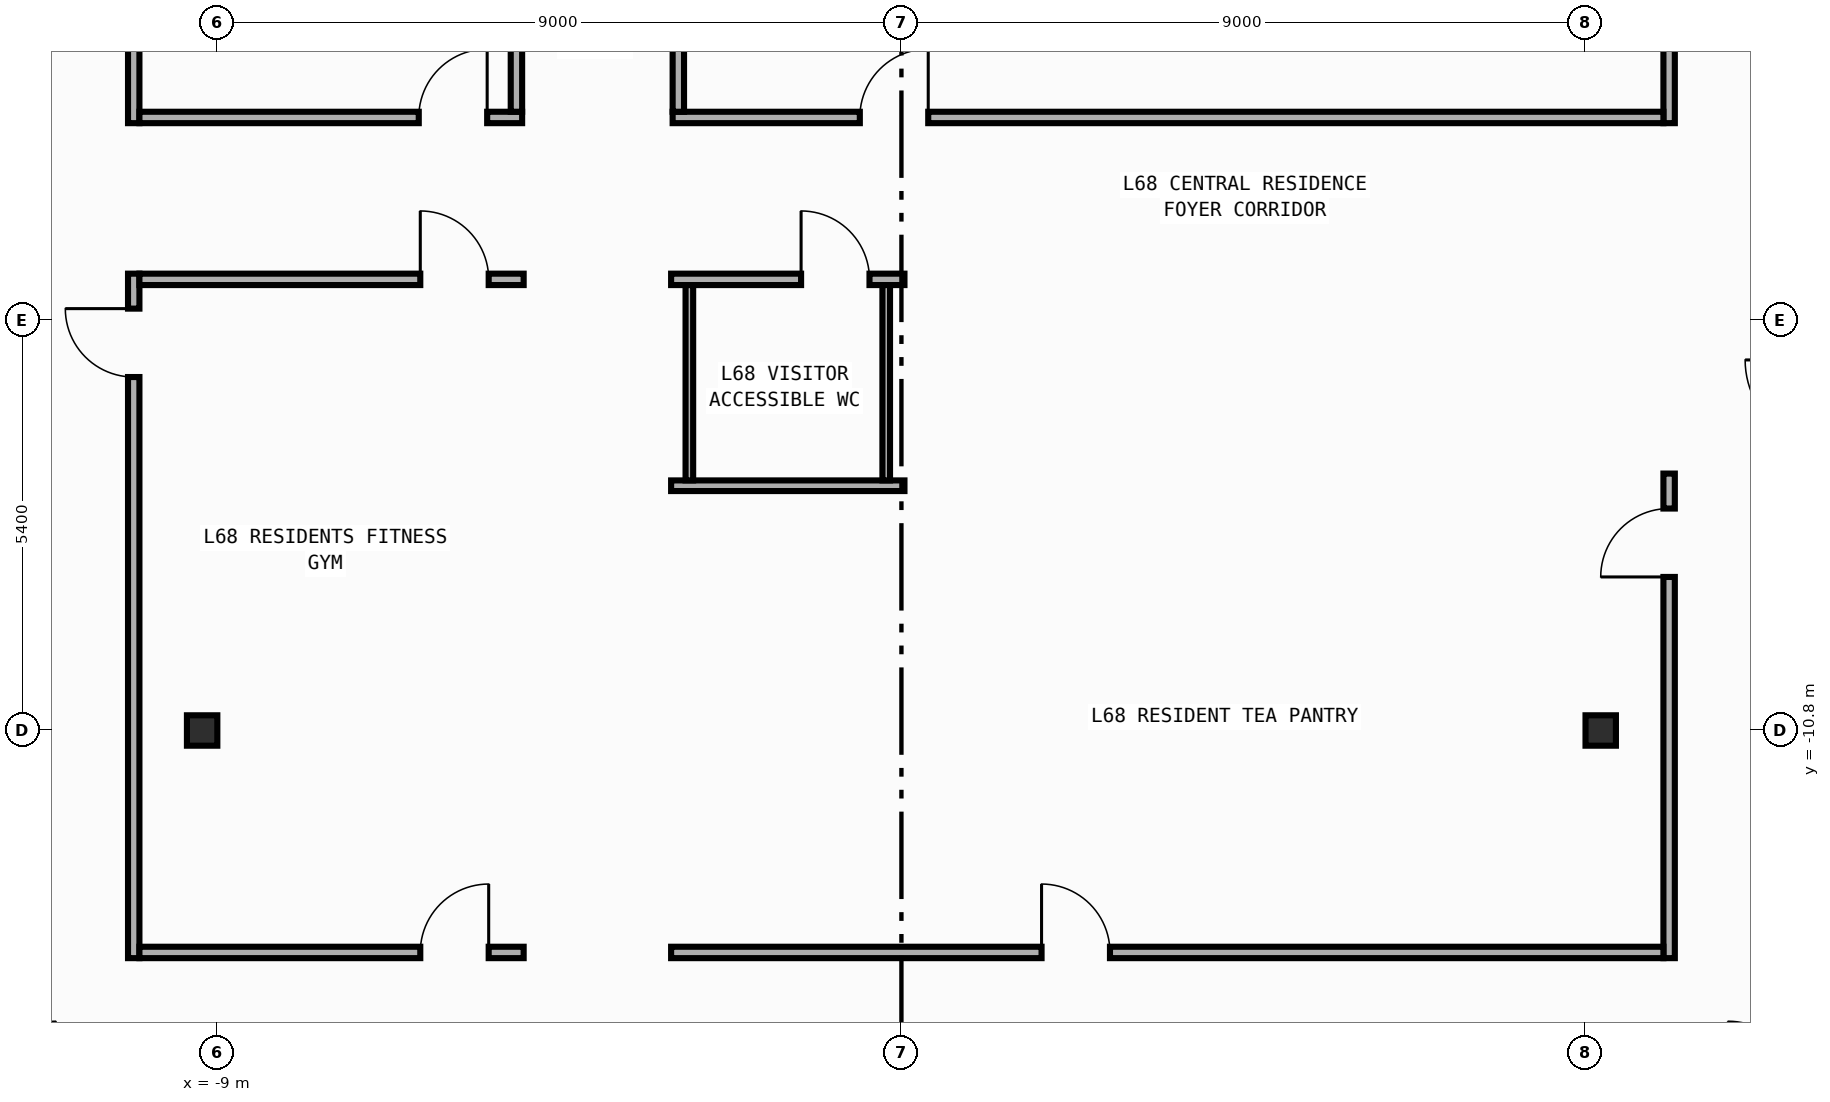
"""IFC4 building model, lengths in metres.
Left out: names, types, materials, properties, quantities, classifications, styles, units other than length and angle.
Written with IfcOpenShell. Run it as: python <this file> out.ifc"""

import sys

from ifc_helpers import new_model, si_unit, direction, frame, frame_2d, origin, origin_2d, place, context, subcontext, project, spatial, rectangle, i_section, extrude, element, fill, save


model = new_model("IFC4")
c1 = context("Model", 3, precision=1e-05, world=origin(), true_north=direction((0.0, 1.0)))
c2 = subcontext(c1, "Body", "Model", "MODEL_VIEW")
j1 = project(units=[si_unit("LENGTHUNIT", "METRE"), si_unit("PLANEANGLEUNIT", "RADIAN")], contexts=[c1])
p1 = place(None, origin())
s1 = spatial("IfcSite", under=j1, at=p1, CompositionType="ELEMENT")
p2 = place(p1, origin())
s2 = spatial("IfcBuilding", under=s1, at=p2, CompositionType="ELEMENT")
p3 = place(p2, frame((0.0, 0.0, 285.2)))
s3 = spatial("IfcBuildingStorey", under=s2, at=p3, CompositionType="ELEMENT", Elevation=285.2)
for number, where, z_axis, x_axis in (
    (1, (-9.2, -10.8, 0.0), (0.0, 0.0, 1.0), (1.0, 0.0, 0.0)),
    (2, (9.2, -10.8, 0.0), (0.0, 0.0, 1.0), (1.0, 0.0, 0.0)),
):
    element("IfcColumn", number, at=place(p3, frame(where, z_axis=z_axis, x_axis=x_axis)), inside=s3, PredefinedType="COLUMN", context=c2, shape_type="SweptSolid", body=[
        extrude(i_section(OverallWidth=0.4, OverallDepth=0.4, WebThickness=0.013, FlangeThickness=0.021, FilletRadius=0.022, at=origin_2d()), origin(), (0.0, 0.0, 1.0), 3.8),
    ])
p4 = place(p3, frame((-10.1, -2.81, 0.0), z_axis=(0.0, 0.0, 1.0), x_axis=(0.0, 1.0, 0.0)))
e3 = element("IfcWall", 3, at=p4, inside=s3, PredefinedType="PARTITIONING", context=c2, shape_type="SweptSolid", body=[
    extrude(rectangle(XDim=16.605, YDim=0.15, at=frame_2d((8.302, 0.0))), origin(), (0.0, 0.0, 1.0), 3.54),
])
p5 = place(p4, frame((7.751, 0.0, 0.0)))
e4 = element("IfcOpeningElement", 4, at=p5, cuts=e3, PredefinedType="OPENING", context=c2, shape_type="SweptSolid", body=[
    extrude(rectangle(XDim=0.9, YDim=2.15, at=frame_2d((0.45, 1.075))), frame((0.0, 0.085, 0.0), z_axis=(0.0, -1.0, 0.0), x_axis=(1.0, 0.0, 0.0)), (0.0, 0.0, 1.0), 0.17),
])
p6 = place(p3, frame((-10.1, -13.795, 0.0), z_axis=(0.0, 0.0, 1.0), x_axis=(0.0, 1.0, 0.0)))
e5 = element("IfcWall", 5, at=p6, inside=s3, PredefinedType="PARTITIONING", context=c2, shape_type="SweptSolid", body=[
    extrude(rectangle(XDim=9.005, YDim=0.15, at=frame_2d((4.502, 0.0))), origin(), (0.0, 0.0, 1.0), 3.54),
])
p7 = place(p6, frame((7.645, 0.0, 0.0)))
e6 = element("IfcOpeningElement", 6, at=p7, cuts=e5, PredefinedType="OPENING", context=c2, shape_type="SweptSolid", body=[
    extrude(rectangle(XDim=0.9, YDim=2.15, at=frame_2d((0.45, 1.075))), frame((0.0, 0.085, 0.0), z_axis=(0.0, -1.0, 0.0), x_axis=(1.0, 0.0, 0.0)), (0.0, 0.0, 1.0), 0.17),
])
p8 = place(p3, frame((10.1, -2.81, 0.0), z_axis=(0.0, 0.0, 1.0), x_axis=(0.0, 1.0, 0.0)))
e7 = element("IfcWall", 7, at=p8, inside=s3, PredefinedType="PARTITIONING", context=c2, shape_type="SweptSolid", body=[
    extrude(rectangle(XDim=16.69, YDim=0.15, at=frame_2d((8.345, 0.0))), origin(), (0.0, 0.0, 1.0), 3.54),
])
p9 = place(p8, frame((7.694, 0.0, 0.0)))
e8 = element("IfcOpeningElement", 8, at=p9, cuts=e7, PredefinedType="OPENING", context=c2, shape_type="SweptSolid", body=[
    extrude(rectangle(XDim=0.9, YDim=2.15, at=frame_2d((0.45, 1.075))), frame((0.0, 0.085, 0.0), z_axis=(0.0, -1.0, 0.0), x_axis=(1.0, 0.0, 0.0)), (0.0, 0.0, 1.0), 0.17),
])
p10 = place(p3, frame((10.1, -13.795, 0.0), z_axis=(0.0, 0.0, 1.0), x_axis=(0.0, 1.0, 0.0)))
e9 = element("IfcWall", 9, at=p10, inside=s3, PredefinedType="PARTITIONING", context=c2, shape_type="SweptSolid", body=[
    extrude(rectangle(XDim=6.375, YDim=0.15, at=frame_2d((3.188, 0.0))), origin(), (0.0, 0.0, 1.0), 3.54),
])
p11 = place(p10, frame((5.015, 0.0, 0.0)))
e10 = element("IfcOpeningElement", 10, at=p11, cuts=e9, PredefinedType="OPENING", context=c2, shape_type="SweptSolid", body=[
    extrude(rectangle(XDim=0.9, YDim=2.15, at=frame_2d((0.45, 1.075))), frame((0.0, 0.085, 0.0), z_axis=(0.0, -1.0, 0.0), x_axis=(1.0, 0.0, 0.0)), (0.0, 0.0, 1.0), 0.17),
])
p12 = place(p3, frame((-10.025, -2.735, 0.0), z_axis=(0.0, 0.0, 1.0), x_axis=(1.0, 0.0, 0.0)))
e11 = element("IfcWall", 11, at=p12, inside=s3, PredefinedType="PARTITIONING", context=c2, shape_type="SweptSolid", body=[
    extrude(rectangle(XDim=5.035, YDim=0.15, at=frame_2d((2.518, 0.0))), origin(), (0.0, 0.0, 1.0), 3.54),
])
p13 = place(p12, frame((3.675, 0.0, 0.0)))
e12 = element("IfcOpeningElement", 12, at=p13, cuts=e11, PredefinedType="OPENING", context=c2, shape_type="SweptSolid", body=[
    extrude(rectangle(XDim=0.9, YDim=2.15, at=frame_2d((0.45, 1.075))), frame((0.0, 0.085, 0.0), z_axis=(0.0, -1.0, 0.0), x_axis=(1.0, 0.0, 0.0)), (0.0, 0.0, 1.0), 0.17),
])
p14 = place(p3, frame((-10.025, -4.865, 0.0), z_axis=(0.0, 0.0, 1.0), x_axis=(1.0, 0.0, 0.0)))
e13 = element("IfcWall", 13, at=p14, inside=s3, PredefinedType="PARTITIONING", context=c2, shape_type="SweptSolid", body=[
    extrude(rectangle(XDim=5.055, YDim=0.15, at=frame_2d((2.527, 0.0))), origin(), (0.0, 0.0, 1.0), 3.54),
])
p15 = place(p14, frame((3.695, 0.0, 0.0)))
e14 = element("IfcOpeningElement", 14, at=p15, cuts=e13, PredefinedType="OPENING", context=c2, shape_type="SweptSolid", body=[
    extrude(rectangle(XDim=0.9, YDim=2.15, at=frame_2d((0.45, 1.075))), frame((0.0, 0.085, 0.0), z_axis=(0.0, -1.0, 0.0), x_axis=(1.0, 0.0, 0.0)), (0.0, 0.0, 1.0), 0.17),
])
p16 = place(p3, frame((-3.01, -2.735, 0.0), z_axis=(0.0, 0.0, 1.0), x_axis=(1.0, 0.0, 0.0)))
e15 = element("IfcWall", 15, at=p16, inside=s3, PredefinedType="PARTITIONING", context=c2, shape_type="SweptSolid", body=[
    extrude(rectangle(XDim=13.035, YDim=0.15, at=frame_2d((6.518, 0.0))), origin(), (0.0, 0.0, 1.0), 3.54),
])
p17 = place(p16, frame((2.463, 0.0, 0.0)))
e16 = element("IfcOpeningElement", 16, at=p17, cuts=e15, PredefinedType="OPENING", context=c2, shape_type="SweptSolid", body=[
    extrude(rectangle(XDim=0.9, YDim=2.15, at=frame_2d((0.45, 1.075))), frame((0.0, 0.085, 0.0), z_axis=(0.0, -1.0, 0.0), x_axis=(1.0, 0.0, 0.0)), (0.0, 0.0, 1.0), 0.17),
])
p18 = place(p3, frame((-3.03, -4.865, 0.0), z_axis=(0.0, 0.0, 1.0), x_axis=(1.0, 0.0, 0.0)))
e17 = element("IfcWall", 17, at=p18, inside=s3, PredefinedType="PARTITIONING", context=c2, shape_type="SweptSolid", body=[
    extrude(rectangle(XDim=3.07, YDim=0.15, at=frame_2d((1.535, 0.0))), origin(), (0.0, 0.0, 1.0), 3.54),
])
p19 = place(p18, frame((1.71, 0.0, 0.0)))
e18 = element("IfcOpeningElement", 18, at=p19, cuts=e17, PredefinedType="OPENING", context=c2, shape_type="SweptSolid", body=[
    extrude(rectangle(XDim=0.9, YDim=2.15, at=frame_2d((0.45, 1.075))), frame((0.0, 0.085, 0.0), z_axis=(0.0, -1.0, 0.0), x_axis=(1.0, 0.0, 0.0)), (0.0, 0.0, 1.0), 0.17),
])
p20 = place(p3, frame((-5.065, -2.66, 0.0), z_axis=(0.0, 0.0, 1.0), x_axis=(0.0, 1.0, 0.0)))
e19 = element("IfcWall", 19, at=p20, inside=s3, PredefinedType="PARTITIONING", context=c2, shape_type="SweptSolid", body=[
    extrude(rectangle(XDim=16.455, YDim=0.15, at=frame_2d((8.228, 0.0))), origin(), (0.0, 0.0, 1.0), 3.19),
])
p21 = place(p20, frame((7.677, 0.0, 0.0)))
e20 = element("IfcOpeningElement", 20, at=p21, cuts=e19, PredefinedType="OPENING", context=c2, shape_type="SweptSolid", body=[
    extrude(rectangle(XDim=0.9, YDim=2.15, at=frame_2d((0.45, 1.075))), frame((0.0, 0.085, 0.0), z_axis=(0.0, -1.0, 0.0), x_axis=(1.0, 0.0, 0.0)), (0.0, 0.0, 1.0), 0.17),
])
p22 = place(p3, frame((-2.935, -2.66, 0.0), z_axis=(0.0, 0.0, 1.0), x_axis=(0.0, 1.0, 0.0)))
e21 = element("IfcWall", 21, at=p22, inside=s3, PredefinedType="PARTITIONING", context=c2, shape_type="SweptSolid", body=[
    extrude(rectangle(XDim=16.455, YDim=0.15, at=frame_2d((8.228, 0.0))), origin(), (0.0, 0.0, 1.0), 3.54),
])
p23 = place(p22, frame((7.677, 0.0, 0.0)))
e22 = element("IfcOpeningElement", 22, at=p23, cuts=e21, PredefinedType="OPENING", context=c2, shape_type="SweptSolid", body=[
    extrude(rectangle(XDim=0.9, YDim=2.15, at=frame_2d((0.45, 1.075))), frame((0.0, 0.085, 0.0), z_axis=(0.0, -1.0, 0.0), x_axis=(1.0, 0.0, 0.0)), (0.0, 0.0, 1.0), 0.17),
])
p24 = place(p3, frame((-10.025, -13.72, 0.0), z_axis=(0.0, 0.0, 1.0), x_axis=(1.0, 0.0, 0.0)))
e23 = element("IfcWall", 23, at=p24, inside=s3, PredefinedType="PARTITIONING", context=c2, shape_type="SweptSolid", body=[
    extrude(rectangle(XDim=5.055, YDim=0.15, at=frame_2d((2.527, 0.0))), origin(), (0.0, 0.0, 1.0), 3.54),
])
p25 = place(p24, frame((3.695, 0.0, 0.0)))
e24 = element("IfcOpeningElement", 24, at=p25, cuts=e23, PredefinedType="OPENING", context=c2, shape_type="SweptSolid", body=[
    extrude(rectangle(XDim=0.9, YDim=2.15, at=frame_2d((0.45, 1.075))), frame((0.0, 0.085, 0.0), z_axis=(0.0, -1.0, 0.0), x_axis=(1.0, 0.0, 0.0)), (0.0, 0.0, 1.0), 0.17),
])
p26 = place(p3, frame((-3.03, -13.72, 0.0), z_axis=(0.0, 0.0, 1.0), x_axis=(1.0, 0.0, 0.0)))
e25 = element("IfcWall", 25, at=p26, inside=s3, PredefinedType="PARTITIONING", context=c2, shape_type="SweptSolid", body=[
    extrude(rectangle(XDim=13.055, YDim=0.15, at=frame_2d((6.527, 0.0))), origin(), (0.0, 0.0, 1.0), 3.54),
])
p27 = place(p26, frame((4.874, 0.0, 0.0)))
e26 = element("IfcOpeningElement", 26, at=p27, cuts=e25, PredefinedType="OPENING", context=c2, shape_type="SweptSolid", body=[
    extrude(rectangle(XDim=0.9, YDim=2.15, at=frame_2d((0.45, 1.075))), frame((0.0, 0.085, 0.0), z_axis=(0.0, -1.0, 0.0), x_axis=(1.0, 0.0, 0.0)), (0.0, 0.0, 1.0), 0.17),
])
p28 = place(p3, frame((-3.03, -7.58, 0.0), z_axis=(0.0, 0.0, 1.0), x_axis=(1.0, 0.0, 0.0)))
e27 = element("IfcWall", 27, at=p28, inside=s3, PredefinedType="PARTITIONING", context=c2, shape_type="SweptSolid", body=[
    extrude(rectangle(XDim=3.07, YDim=0.14, at=frame_2d((1.535, 0.0))), origin(), (0.0, 0.0, 1.0), 3.54),
])
for number, where, z_axis, x_axis in (
    (28, (-0.2, -4.94, 0.0), (0.0, 0.0, 1.0), (0.0, -1.0, 0.0)),
    (29, (-2.79, -7.51, 0.0), (0.0, 0.0, 1.0), (0.0, 1.0, 0.0)),
):
    element("IfcWall", number, at=place(p3, frame(where, z_axis=z_axis, x_axis=x_axis)), inside=s3, PredefinedType="PARTITIONING", context=c2, shape_type="SweptSolid", body=[
        extrude(rectangle(XDim=2.57, YDim=0.1, at=frame_2d((1.285, 0.0))), origin(), (0.0, 0.0, 1.0), 3.54),
    ])
p29 = place(p7, origin())
e30 = element("IfcDoor", 30, at=p29, inside=s3, OperationType="SINGLE_SWING_RIGHT", PredefinedType="DOOR", context=c2, shape_type="SweptSolid", body=[
    extrude(rectangle(XDim=0.9, YDim=2.15, at=frame_2d((0.45, 1.075))), frame((0.0, 0.025, 0.0), z_axis=(0.0, -1.0, 0.0), x_axis=(1.0, 0.0, 0.0)), (0.0, 0.0, 1.0), 0.05),
])
fill(e6, e30)
p30 = place(p11, origin())
e31 = element("IfcDoor", 31, at=p30, inside=s3, OperationType="SINGLE_SWING_LEFT", PredefinedType="DOOR", context=c2, shape_type="SweptSolid", body=[
    extrude(rectangle(XDim=0.9, YDim=2.15, at=frame_2d((0.45, 1.075))), frame((0.0, 0.025, 0.0), z_axis=(0.0, -1.0, 0.0), x_axis=(1.0, 0.0, 0.0)), (0.0, 0.0, 1.0), 0.05),
])
fill(e10, e31)
p31 = place(p13, origin())
e32 = element("IfcDoor", 32, at=p31, inside=s3, OperationType="SINGLE_SWING_RIGHT", PredefinedType="DOOR", context=c2, shape_type="SweptSolid", body=[
    extrude(rectangle(XDim=0.9, YDim=2.15, at=frame_2d((0.45, 1.075))), frame((0.0, 0.025, 0.0), z_axis=(0.0, -1.0, 0.0), x_axis=(1.0, 0.0, 0.0)), (0.0, 0.0, 1.0), 0.05),
])
fill(e12, e32)
p32 = place(p15, origin())
e33 = element("IfcDoor", 33, at=p32, inside=s3, OperationType="SINGLE_SWING_LEFT", PredefinedType="DOOR", context=c2, shape_type="SweptSolid", body=[
    extrude(rectangle(XDim=0.9, YDim=2.15, at=frame_2d((0.45, 1.075))), frame((0.0, 0.025, 0.0), z_axis=(0.0, -1.0, 0.0), x_axis=(1.0, 0.0, 0.0)), (0.0, 0.0, 1.0), 0.05),
])
fill(e14, e33)
p33 = place(p17, origin())
e34 = element("IfcDoor", 34, at=p33, inside=s3, OperationType="SINGLE_SWING_RIGHT", PredefinedType="DOOR", context=c2, shape_type="SweptSolid", body=[
    extrude(rectangle(XDim=0.9, YDim=2.15, at=frame_2d((0.45, 1.075))), frame((0.0, 0.025, 0.0), z_axis=(0.0, -1.0, 0.0), x_axis=(1.0, 0.0, 0.0)), (0.0, 0.0, 1.0), 0.05),
])
fill(e16, e34)
p34 = place(p19, origin())
e35 = element("IfcDoor", 35, at=p34, inside=s3, OperationType="SINGLE_SWING_LEFT", PredefinedType="DOOR", context=c2, shape_type="SweptSolid", body=[
    extrude(rectangle(XDim=0.9, YDim=2.15, at=frame_2d((0.45, 1.075))), frame((0.0, 0.025, 0.0), z_axis=(0.0, -1.0, 0.0), x_axis=(1.0, 0.0, 0.0)), (0.0, 0.0, 1.0), 0.05),
])
fill(e18, e35)
p35 = place(p25, origin())
e36 = element("IfcDoor", 36, at=p35, inside=s3, OperationType="SINGLE_SWING_RIGHT", PredefinedType="DOOR", context=c2, shape_type="SweptSolid", body=[
    extrude(rectangle(XDim=0.9, YDim=2.15, at=frame_2d((0.45, 1.075))), frame((0.0, 0.025, 0.0), z_axis=(0.0, -1.0, 0.0), x_axis=(1.0, 0.0, 0.0)), (0.0, 0.0, 1.0), 0.05),
])
fill(e24, e36)
p36 = place(p27, origin())
e37 = element("IfcDoor", 37, at=p36, inside=s3, OperationType="SINGLE_SWING_LEFT", PredefinedType="DOOR", context=c2, shape_type="SweptSolid", body=[
    extrude(rectangle(XDim=0.9, YDim=2.15, at=frame_2d((0.45, 1.075))), frame((0.0, 0.025, 0.0), z_axis=(0.0, -1.0, 0.0), x_axis=(1.0, 0.0, 0.0)), (0.0, 0.0, 1.0), 0.05),
])
fill(e26, e37)
save(model, sys.argv[1])
